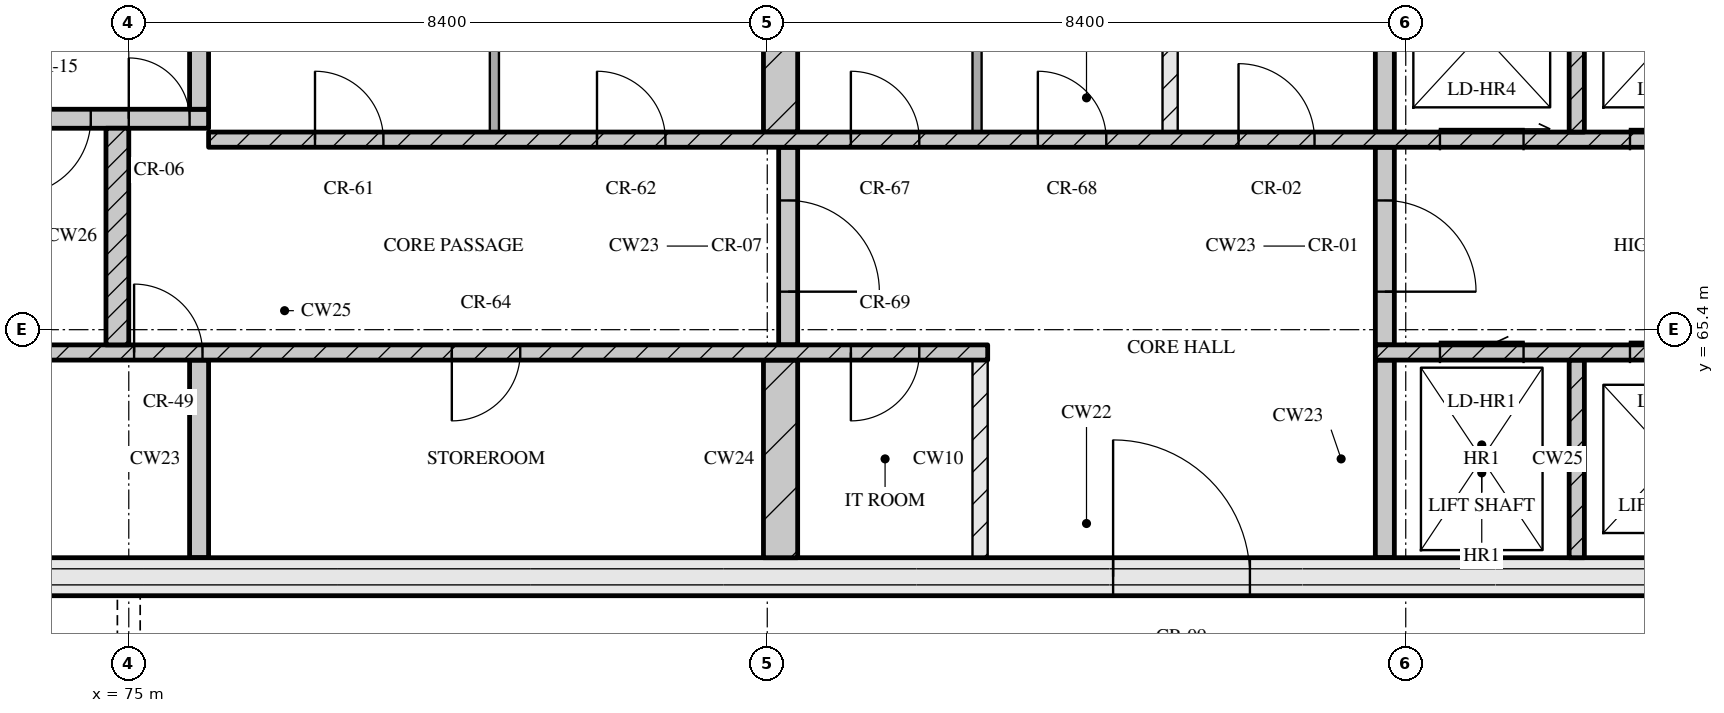
"""IFC4 building model, lengths in metres.
Left out: names, types, materials, properties, quantities, classifications, styles, units other than length and angle.
Written with IfcOpenShell. Run it as: python <this file> out.ifc"""

import sys

from ifc_helpers import new_model, si_unit, direction, frame, frame_2d, origin, place, context, subcontext, project, spatial, rectangle, extrude, element, fill, save


model = new_model("IFC4")
c1 = context("Model", 3, precision=1e-05, world=origin(), true_north=direction((0.0, 1.0)))
c2 = subcontext(c1, "Body", "Model", "MODEL_VIEW")
j1 = project(units=[si_unit("LENGTHUNIT", "METRE"), si_unit("PLANEANGLEUNIT", "RADIAN")], contexts=[c1])
p1 = place(None, origin())
s1 = spatial("IfcSite", under=j1, at=p1, CompositionType="ELEMENT")
p2 = place(p1, origin())
s2 = spatial("IfcBuilding", under=s1, at=p2, CompositionType="ELEMENT")
p3 = place(p2, frame((0.0, 0.0, 299.55)))
s3 = spatial("IfcBuildingStorey", under=s2, at=p3, CompositionType="ELEMENT", Elevation=299.55)
p4 = place(p3, frame((67.3, 62.15, 0.0), z_axis=(0.0, 0.0, 1.0), x_axis=(1.0, 0.0, 0.0)))
e1 = element("IfcWall", 1, at=p4, inside=s3, PredefinedType="SOLIDWALL", context=c2, shape_type="SweptSolid", body=[
    extrude(rectangle(XDim=40.6, YDim=0.5, at=frame_2d((20.3, 0.0))), origin(), (0.0, 0.0, 1.0), 3.32),
])
p5 = place(p4, frame((20.65, 0.0, 0.0)))
e2 = element("IfcOpeningElement", 2, at=p5, cuts=e1, PredefinedType="OPENING", context=c2, shape_type="SweptSolid", body=[
    extrude(rectangle(XDim=1.8, YDim=2.1, at=frame_2d((0.9, 1.05))), frame((0.0, 0.26, 0.0), z_axis=(0.0, -1.0, 0.0), x_axis=(1.0, 0.0, 0.0)), (0.0, 0.0, 1.0), 0.52),
])
p6 = place(p3, frame((75.925, 62.4, 0.0), z_axis=(0.0, 0.0, 1.0), x_axis=(0.0, 1.0, 0.0)))
e3 = element("IfcWall", 3, at=p6, inside=s3, PredefinedType="SOLIDWALL", context=c2, shape_type="SweptSolid", body=[
    extrude(rectangle(XDim=2.6, YDim=0.25, at=frame_2d((1.3, 0.0))), origin(), (0.0, 0.0, 1.0), 3.32),
])
p7 = place(p3, frame((83.575, 62.4, 0.0), z_axis=(0.0, 0.0, 1.0), x_axis=(0.0, 1.0, 0.0)))
e4 = element("IfcWall", 4, at=p7, inside=s3, PredefinedType="SOLIDWALL", context=c2, shape_type="SweptSolid", body=[
    extrude(rectangle(XDim=2.6, YDim=0.45, at=frame_2d((1.3, 0.0))), origin(), (0.0, 0.0, 1.0), 3.32),
])
p8 = place(p3, frame((86.2, 62.4, 0.0), z_axis=(0.0, 0.0, 1.0), x_axis=(0.0, 1.0, 0.0)))
e5 = element("IfcWall", 5, at=p8, inside=s3, PredefinedType="PARTITIONING", context=c2, shape_type="SweptSolid", body=[
    extrude(rectangle(XDim=2.6, YDim=0.2, at=frame_2d((1.3, 0.0))), origin(), (0.0, 0.0, 1.0), 3.32),
])
p9 = place(p3, frame((91.525, 62.4, 0.0), z_axis=(0.0, 0.0, 1.0), x_axis=(0.0, 1.0, 0.0)))
e6 = element("IfcWall", 6, at=p9, inside=s3, PredefinedType="SOLIDWALL", context=c2, shape_type="SweptSolid", body=[
    extrude(rectangle(XDim=2.6, YDim=0.25, at=frame_2d((1.3, 0.0))), origin(), (0.0, 0.0, 1.0), 3.32),
])
p10 = place(p3, frame((94.05, 62.4, 0.0), z_axis=(0.0, 0.0, 1.0), x_axis=(0.0, 1.0, 0.0)))
e7 = element("IfcWall", 7, at=p10, inside=s3, PredefinedType="SOLIDWALL", context=c2, shape_type="SweptSolid", body=[
    extrude(rectangle(XDim=2.6, YDim=0.2, at=frame_2d((1.3, 0.0))), origin(), (0.0, 0.0, 1.0), 3.32),
])
p11 = place(p3, frame((67.8, 65.1, 0.0), z_axis=(0.0, 0.0, 1.0), x_axis=(1.0, 0.0, 0.0)))
e8 = element("IfcWall", 8, at=p11, inside=s3, PredefinedType="SOLIDWALL", context=c2, shape_type="SweptSolid", body=[
    extrude(rectangle(XDim=18.5, YDim=0.2, at=frame_2d((9.25, 0.0))), origin(), (0.0, 0.0, 1.0), 3.32),
])
p12 = place(p11, frame((7.27, 0.0, 0.0)))
e9 = element("IfcOpeningElement", 9, at=p12, cuts=e8, PredefinedType="OPENING", context=c2, shape_type="SweptSolid", body=[
    extrude(rectangle(XDim=0.9, YDim=2.1, at=frame_2d((0.45, 1.05))), frame((0.0, 0.11, 0.0), z_axis=(0.0, -1.0, 0.0), x_axis=(1.0, 0.0, 0.0)), (0.0, 0.0, 1.0), 0.22),
])
p13 = place(p11, frame((11.45, 0.0, 0.0)))
e10 = element("IfcOpeningElement", 10, at=p13, cuts=e8, PredefinedType="OPENING", context=c2, shape_type="SweptSolid", body=[
    extrude(rectangle(XDim=0.9, YDim=2.1, at=frame_2d((0.45, 1.05))), frame((0.0, 0.11, 0.0), z_axis=(0.0, -1.0, 0.0), x_axis=(1.0, 0.0, 0.0)), (0.0, 0.0, 1.0), 0.22),
])
p14 = place(p11, frame((16.7, 0.0, 0.0)))
e11 = element("IfcOpeningElement", 11, at=p14, cuts=e8, PredefinedType="OPENING", context=c2, shape_type="SweptSolid", body=[
    extrude(rectangle(XDim=0.9, YDim=2.1, at=frame_2d((0.45, 1.05))), frame((0.0, 0.11, 0.0), z_axis=(0.0, -1.0, 0.0), x_axis=(1.0, 0.0, 0.0)), (0.0, 0.0, 1.0), 0.22),
])
p15 = place(p3, frame((91.4, 65.1, 0.0), z_axis=(0.0, 0.0, 1.0), x_axis=(1.0, 0.0, 0.0)))
e12 = element("IfcWall", 12, at=p15, inside=s3, PredefinedType="SOLIDWALL", context=c2, shape_type="SweptSolid", body=[
    extrude(rectangle(XDim=16.0, YDim=0.2, at=frame_2d((8.0, 0.0))), origin(), (0.0, 0.0, 1.0), 3.32),
])
p16 = place(p15, frame((0.85, 0.0, 0.0)))
e13 = element("IfcOpeningElement", 13, at=p16, cuts=e12, PredefinedType="OPENING", context=c2, shape_type="SweptSolid", body=[
    extrude(rectangle(XDim=1.1, YDim=2.1, at=frame_2d((0.55, 1.05))), frame((0.0, 0.11, 0.0), z_axis=(0.0, -1.0, 0.0), x_axis=(1.0, 0.0, 0.0)), (0.0, 0.0, 1.0), 0.22),
])
p17 = place(p15, frame((3.35, 0.0, 0.0)))
e14 = element("IfcOpeningElement", 14, at=p17, cuts=e12, PredefinedType="OPENING", context=c2, shape_type="SweptSolid", body=[
    extrude(rectangle(XDim=1.1, YDim=2.1, at=frame_2d((0.55, 1.05))), frame((0.0, 0.11, 0.0), z_axis=(0.0, -1.0, 0.0), x_axis=(1.0, 0.0, 0.0)), (0.0, 0.0, 1.0), 0.22),
])
p18 = place(p15, frame((5.85, 0.0, 0.0)))
e15 = element("IfcOpeningElement", 15, at=p18, cuts=e12, PredefinedType="OPENING", context=c2, shape_type="SweptSolid", body=[
    extrude(rectangle(XDim=1.1, YDim=2.1, at=frame_2d((0.55, 1.05))), frame((0.0, 0.11, 0.0), z_axis=(0.0, -1.0, 0.0), x_axis=(1.0, 0.0, 0.0)), (0.0, 0.0, 1.0), 0.22),
])
p19 = place(p15, frame((7.83, 0.0, 0.0)))
e16 = element("IfcOpeningElement", 16, at=p19, cuts=e12, PredefinedType="OPENING", context=c2, shape_type="SweptSolid", body=[
    extrude(rectangle(XDim=0.9, YDim=2.1, at=frame_2d((0.45, 1.05))), frame((0.0, 0.11, 0.0), z_axis=(0.0, -1.0, 0.0), x_axis=(1.0, 0.0, 0.0)), (0.0, 0.0, 1.0), 0.22),
])
p20 = place(p3, frame((74.85, 65.2, 0.0), z_axis=(0.0, 0.0, 1.0), x_axis=(0.0, 1.0, 0.0)))
e17 = element("IfcWall", 17, at=p20, inside=s3, PredefinedType="SOLIDWALL", context=c2, shape_type="SweptSolid", body=[
    extrude(rectangle(XDim=2.85, YDim=0.3, at=frame_2d((1.425, 0.0))), origin(), (0.0, 0.0, 1.0), 3.32),
])
p21 = place(p3, frame((83.675, 65.2, 0.0), z_axis=(0.0, 0.0, 1.0), x_axis=(0.0, 1.0, 0.0)))
e18 = element("IfcWall", 18, at=p21, inside=s3, PredefinedType="SOLIDWALL", context=c2, shape_type="SweptSolid", body=[
    extrude(rectangle(XDim=2.6, YDim=0.25, at=frame_2d((1.3, 0.0))), origin(), (0.0, 0.0, 1.0), 3.32),
])
p22 = place(p21, frame((0.7, 0.0, 0.0)))
e19 = element("IfcOpeningElement", 19, at=p22, cuts=e18, PredefinedType="OPENING", context=c2, shape_type="SweptSolid", body=[
    extrude(rectangle(XDim=1.2, YDim=2.1, at=frame_2d((0.6, 1.05))), frame((0.0, 0.135, 0.0), z_axis=(0.0, -1.0, 0.0), x_axis=(1.0, 0.0, 0.0)), (0.0, 0.0, 1.0), 0.27),
])
p23 = place(p3, frame((91.525, 65.2, 0.0), z_axis=(0.0, 0.0, 1.0), x_axis=(0.0, 1.0, 0.0)))
e20 = element("IfcWall", 20, at=p23, inside=s3, PredefinedType="SOLIDWALL", context=c2, shape_type="SweptSolid", body=[
    extrude(rectangle(XDim=2.6, YDim=0.25, at=frame_2d((1.3, 0.0))), origin(), (0.0, 0.0, 1.0), 3.32),
])
p24 = place(p23, frame((0.7, 0.0, 0.0)))
e21 = element("IfcOpeningElement", 21, at=p24, cuts=e20, PredefinedType="OPENING", context=c2, shape_type="SweptSolid", body=[
    extrude(rectangle(XDim=1.2, YDim=2.1, at=frame_2d((0.6, 1.05))), frame((0.0, 0.135, 0.0), z_axis=(0.0, -1.0, 0.0), x_axis=(1.0, 0.0, 0.0)), (0.0, 0.0, 1.0), 0.27),
])
p25 = place(p3, frame((76.05, 67.9, 0.0), z_axis=(0.0, 0.0, 1.0), x_axis=(1.0, 0.0, 0.0)))
e22 = element("IfcWall", 22, at=p25, inside=s3, PredefinedType="SOLIDWALL", context=c2, shape_type="SweptSolid", body=[
    extrude(rectangle(XDim=23.1, YDim=0.2, at=frame_2d((11.55, 0.0))), origin(), (0.0, 0.0, 1.0), 3.32),
])
p26 = place(p25, frame((1.4, 0.0, 0.0)))
e23 = element("IfcOpeningElement", 23, at=p26, cuts=e22, PredefinedType="OPENING", context=c2, shape_type="SweptSolid", body=[
    extrude(rectangle(XDim=0.9, YDim=2.1, at=frame_2d((0.45, 1.05))), frame((0.0, 0.11, 0.0), z_axis=(0.0, -1.0, 0.0), x_axis=(1.0, 0.0, 0.0)), (0.0, 0.0, 1.0), 0.22),
])
p27 = place(p25, frame((5.11, 0.0, 0.0)))
e24 = element("IfcOpeningElement", 24, at=p27, cuts=e22, PredefinedType="OPENING", context=c2, shape_type="SweptSolid", body=[
    extrude(rectangle(XDim=0.9, YDim=2.1, at=frame_2d((0.45, 1.05))), frame((0.0, 0.11, 0.0), z_axis=(0.0, -1.0, 0.0), x_axis=(1.0, 0.0, 0.0)), (0.0, 0.0, 1.0), 0.22),
])
p28 = place(p25, frame((8.45, 0.0, 0.0)))
e25 = element("IfcOpeningElement", 25, at=p28, cuts=e22, PredefinedType="OPENING", context=c2, shape_type="SweptSolid", body=[
    extrude(rectangle(XDim=0.9, YDim=2.1, at=frame_2d((0.45, 1.05))), frame((0.0, 0.11, 0.0), z_axis=(0.0, -1.0, 0.0), x_axis=(1.0, 0.0, 0.0)), (0.0, 0.0, 1.0), 0.22),
])
p29 = place(p25, frame((10.91, 0.0, 0.0)))
e26 = element("IfcOpeningElement", 26, at=p29, cuts=e22, PredefinedType="OPENING", context=c2, shape_type="SweptSolid", body=[
    extrude(rectangle(XDim=0.9, YDim=2.1, at=frame_2d((0.45, 1.05))), frame((0.0, 0.11, 0.0), z_axis=(0.0, -1.0, 0.0), x_axis=(1.0, 0.0, 0.0)), (0.0, 0.0, 1.0), 0.22),
])
p30 = place(p25, frame((13.55, 0.0, 0.0)))
e27 = element("IfcOpeningElement", 27, at=p30, cuts=e22, PredefinedType="OPENING", context=c2, shape_type="SweptSolid", body=[
    extrude(rectangle(XDim=1.0, YDim=2.1, at=frame_2d((0.5, 1.05))), frame((0.0, 0.11, 0.0), z_axis=(0.0, -1.0, 0.0), x_axis=(1.0, 0.0, 0.0)), (0.0, 0.0, 1.0), 0.22),
])
p31 = place(p25, frame((16.2, 0.0, 0.0)))
e28 = element("IfcOpeningElement", 28, at=p31, cuts=e22, PredefinedType="OPENING", context=c2, shape_type="SweptSolid", body=[
    extrude(rectangle(XDim=1.1, YDim=2.1, at=frame_2d((0.55, 1.05))), frame((0.0, 0.11, 0.0), z_axis=(0.0, -1.0, 0.0), x_axis=(1.0, 0.0, 0.0)), (0.0, 0.0, 1.0), 0.22),
])
p32 = place(p25, frame((18.7, 0.0, 0.0)))
e29 = element("IfcOpeningElement", 29, at=p32, cuts=e22, PredefinedType="OPENING", context=c2, shape_type="SweptSolid", body=[
    extrude(rectangle(XDim=1.1, YDim=2.1, at=frame_2d((0.55, 1.05))), frame((0.0, 0.11, 0.0), z_axis=(0.0, -1.0, 0.0), x_axis=(1.0, 0.0, 0.0)), (0.0, 0.0, 1.0), 0.22),
])
p33 = place(p25, frame((21.2, 0.0, 0.0)))
e30 = element("IfcOpeningElement", 30, at=p33, cuts=e22, PredefinedType="OPENING", context=c2, shape_type="SweptSolid", body=[
    extrude(rectangle(XDim=1.1, YDim=2.1, at=frame_2d((0.55, 1.05))), frame((0.0, 0.11, 0.0), z_axis=(0.0, -1.0, 0.0), x_axis=(1.0, 0.0, 0.0)), (0.0, 0.0, 1.0), 0.22),
])
p34 = place(p3, frame((79.81, 68.0, 0.0), z_axis=(0.0, 0.0, 1.0), x_axis=(0.0, 1.0, 0.0)))
e31 = element("IfcWall", 31, at=p34, inside=s3, PredefinedType="PARTITIONING", context=c2, shape_type="SweptSolid", body=[
    extrude(rectangle(XDim=2.6, YDim=0.12, at=frame_2d((1.3, 0.0))), origin(), (0.0, 0.0, 1.0), 3.32),
])
p35 = place(p3, frame((83.575, 68.0, 0.0), z_axis=(0.0, 0.0, 1.0), x_axis=(0.0, 1.0, 0.0)))
e32 = element("IfcWall", 32, at=p35, inside=s3, PredefinedType="SOLIDWALL", context=c2, shape_type="SweptSolid", body=[
    extrude(rectangle(XDim=2.6, YDim=0.45, at=frame_2d((1.3, 0.0))), origin(), (0.0, 0.0, 1.0), 3.32),
])
p36 = place(p3, frame((86.16, 68.0, 0.0), z_axis=(0.0, 0.0, 1.0), x_axis=(0.0, 1.0, 0.0)))
e33 = element("IfcWall", 33, at=p36, inside=s3, PredefinedType="PARTITIONING", context=c2, shape_type="SweptSolid", body=[
    extrude(rectangle(XDim=2.6, YDim=0.12, at=frame_2d((1.3, 0.0))), origin(), (0.0, 0.0, 1.0), 3.32),
])
p37 = place(p3, frame((88.7, 68.0, 0.0), z_axis=(0.0, 0.0, 1.0), x_axis=(0.0, 1.0, 0.0)))
e34 = element("IfcWall", 34, at=p37, inside=s3, PredefinedType="PARTITIONING", context=c2, shape_type="SweptSolid", body=[
    extrude(rectangle(XDim=2.6, YDim=0.2, at=frame_2d((1.3, 0.0))), origin(), (0.0, 0.0, 1.0), 3.32),
])
p38 = place(p3, frame((91.525, 68.0, 0.0), z_axis=(0.0, 0.0, 1.0), x_axis=(0.0, 1.0, 0.0)))
e35 = element("IfcWall", 35, at=p38, inside=s3, PredefinedType="SOLIDWALL", context=c2, shape_type="SweptSolid", body=[
    extrude(rectangle(XDim=2.6, YDim=0.25, at=frame_2d((1.3, 0.0))), origin(), (0.0, 0.0, 1.0), 3.32),
])
p39 = place(p3, frame((94.05, 68.0, 0.0), z_axis=(0.0, 0.0, 1.0), x_axis=(0.0, 1.0, 0.0)))
e36 = element("IfcWall", 36, at=p39, inside=s3, PredefinedType="SOLIDWALL", context=c2, shape_type="SweptSolid", body=[
    extrude(rectangle(XDim=2.6, YDim=0.2, at=frame_2d((1.3, 0.0))), origin(), (0.0, 0.0, 1.0), 3.32),
])
p40 = place(p3, frame((67.8, 68.175, 0.0), z_axis=(0.0, 0.0, 1.0), x_axis=(1.0, 0.0, 0.0)))
e37 = element("IfcWall", 37, at=p40, inside=s3, PredefinedType="SOLIDWALL", context=c2, shape_type="SweptSolid", body=[
    extrude(rectangle(XDim=8.25, YDim=0.25, at=frame_2d((4.125, 0.0))), origin(), (0.0, 0.0, 1.0), 3.32),
])
p41 = place(p40, frame((5.7, 0.0, 0.0)))
e38 = element("IfcOpeningElement", 38, at=p41, cuts=e37, PredefinedType="OPENING", context=c2, shape_type="SweptSolid", body=[
    extrude(rectangle(XDim=1.0, YDim=2.1, at=frame_2d((0.5, 1.05))), frame((0.0, 0.135, 0.0), z_axis=(0.0, -1.0, 0.0), x_axis=(1.0, 0.0, 0.0)), (0.0, 0.0, 1.0), 0.27),
])
p42 = place(p40, frame((7.2, 0.0, 0.0)))
e39 = element("IfcOpeningElement", 39, at=p42, cuts=e37, PredefinedType="OPENING", context=c2, shape_type="SweptSolid", body=[
    extrude(rectangle(XDim=0.8, YDim=2.1, at=frame_2d((0.4, 1.05))), frame((0.0, 0.135, 0.0), z_axis=(0.0, -1.0, 0.0), x_axis=(1.0, 0.0, 0.0)), (0.0, 0.0, 1.0), 0.27),
])
p43 = place(p3, frame((75.925, 68.3, 0.0), z_axis=(0.0, 0.0, 1.0), x_axis=(0.0, 1.0, 0.0)))
e40 = element("IfcWall", 40, at=p43, inside=s3, PredefinedType="SOLIDWALL", context=c2, shape_type="SweptSolid", body=[
    extrude(rectangle(XDim=2.3, YDim=0.25, at=frame_2d((1.15, 0.0))), origin(), (0.0, 0.0, 1.0), 3.32),
])
p44 = place(p5, origin())
e41 = element("IfcDoor", 41, at=p44, inside=s3, OperationType="DOUBLE_DOOR_SINGLE_SWING", PredefinedType="DOOR", context=c2, shape_type="SweptSolid", body=[
    extrude(rectangle(XDim=1.8, YDim=2.1, at=frame_2d((0.9, 1.05))), frame((0.0, 0.025, 0.0), z_axis=(0.0, -1.0, 0.0), x_axis=(1.0, 0.0, 0.0)), (0.0, 0.0, 1.0), 0.05),
])
fill(e2, e41)
p45 = place(p12, origin())
e42 = element("IfcDoor", 42, at=p45, inside=s3, OperationType="SINGLE_SWING_LEFT", PredefinedType="DOOR", context=c2, shape_type="SweptSolid", body=[
    extrude(rectangle(XDim=0.9, YDim=2.1, at=frame_2d((0.45, 1.05))), frame((0.0, 0.025, 0.0), z_axis=(0.0, -1.0, 0.0), x_axis=(1.0, 0.0, 0.0)), (0.0, 0.0, 1.0), 0.05),
])
fill(e9, e42)
p46 = place(p13, origin())
e43 = element("IfcDoor", 43, at=p46, inside=s3, OperationType="SINGLE_SWING_RIGHT", PredefinedType="DOOR", context=c2, shape_type="SweptSolid", body=[
    extrude(rectangle(XDim=0.9, YDim=2.1, at=frame_2d((0.45, 1.05))), frame((0.0, 0.025, 0.0), z_axis=(0.0, -1.0, 0.0), x_axis=(1.0, 0.0, 0.0)), (0.0, 0.0, 1.0), 0.05),
])
fill(e10, e43)
p47 = place(p14, origin())
e44 = element("IfcDoor", 44, at=p47, inside=s3, OperationType="SINGLE_SWING_RIGHT", PredefinedType="DOOR", context=c2, shape_type="SweptSolid", body=[
    extrude(rectangle(XDim=0.9, YDim=2.1, at=frame_2d((0.45, 1.05))), frame((0.0, 0.025, 0.0), z_axis=(0.0, -1.0, 0.0), x_axis=(1.0, 0.0, 0.0)), (0.0, 0.0, 1.0), 0.05),
])
fill(e11, e44)
p48 = place(p16, origin())
e45 = element("IfcDoor", 45, at=p48, inside=s3, OperationType="SLIDING_TO_LEFT", PredefinedType="DOOR", context=c2, shape_type="SweptSolid", body=[
    extrude(rectangle(XDim=1.1, YDim=2.1, at=frame_2d((0.55, 1.05))), frame((0.0, 0.025, 0.0), z_axis=(0.0, -1.0, 0.0), x_axis=(1.0, 0.0, 0.0)), (0.0, 0.0, 1.0), 0.05),
])
fill(e13, e45)
p49 = place(p17, origin())
e46 = element("IfcDoor", 46, at=p49, inside=s3, OperationType="SLIDING_TO_LEFT", PredefinedType="DOOR", context=c2, shape_type="SweptSolid", body=[
    extrude(rectangle(XDim=1.1, YDim=2.1, at=frame_2d((0.55, 1.05))), frame((0.0, 0.025, 0.0), z_axis=(0.0, -1.0, 0.0), x_axis=(1.0, 0.0, 0.0)), (0.0, 0.0, 1.0), 0.05),
])
fill(e14, e46)
p50 = place(p22, origin())
e47 = element("IfcDoor", 47, at=p50, inside=s3, OperationType="SINGLE_SWING_RIGHT", PredefinedType="DOOR", context=c2, shape_type="SweptSolid", body=[
    extrude(rectangle(XDim=1.2, YDim=2.1, at=frame_2d((0.6, 1.05))), frame((0.0, 0.025, 0.0), z_axis=(0.0, -1.0, 0.0), x_axis=(1.0, 0.0, 0.0)), (0.0, 0.0, 1.0), 0.05),
])
fill(e19, e47)
p51 = place(p24, origin())
e48 = element("IfcDoor", 48, at=p51, inside=s3, OperationType="SINGLE_SWING_RIGHT", PredefinedType="DOOR", context=c2, shape_type="SweptSolid", body=[
    extrude(rectangle(XDim=1.2, YDim=2.1, at=frame_2d((0.6, 1.05))), frame((0.0, 0.025, 0.0), z_axis=(0.0, -1.0, 0.0), x_axis=(1.0, 0.0, 0.0)), (0.0, 0.0, 1.0), 0.05),
])
fill(e21, e48)
p52 = place(p26, origin())
e49 = element("IfcDoor", 49, at=p52, inside=s3, OperationType="SINGLE_SWING_LEFT", PredefinedType="DOOR", context=c2, shape_type="SweptSolid", body=[
    extrude(rectangle(XDim=0.9, YDim=2.1, at=frame_2d((0.45, 1.05))), frame((0.0, 0.025, 0.0), z_axis=(0.0, -1.0, 0.0), x_axis=(1.0, 0.0, 0.0)), (0.0, 0.0, 1.0), 0.05),
])
fill(e23, e49)
p53 = place(p27, origin())
e50 = element("IfcDoor", 50, at=p53, inside=s3, OperationType="SINGLE_SWING_LEFT", PredefinedType="DOOR", context=c2, shape_type="SweptSolid", body=[
    extrude(rectangle(XDim=0.9, YDim=2.1, at=frame_2d((0.45, 1.05))), frame((0.0, 0.025, 0.0), z_axis=(0.0, -1.0, 0.0), x_axis=(1.0, 0.0, 0.0)), (0.0, 0.0, 1.0), 0.05),
])
fill(e24, e50)
p54 = place(p28, origin())
e51 = element("IfcDoor", 51, at=p54, inside=s3, OperationType="SINGLE_SWING_LEFT", PredefinedType="DOOR", context=c2, shape_type="SweptSolid", body=[
    extrude(rectangle(XDim=0.9, YDim=2.1, at=frame_2d((0.45, 1.05))), frame((0.0, 0.025, 0.0), z_axis=(0.0, -1.0, 0.0), x_axis=(1.0, 0.0, 0.0)), (0.0, 0.0, 1.0), 0.05),
])
fill(e25, e51)
p55 = place(p29, origin())
e52 = element("IfcDoor", 52, at=p55, inside=s3, OperationType="SINGLE_SWING_LEFT", PredefinedType="DOOR", context=c2, shape_type="SweptSolid", body=[
    extrude(rectangle(XDim=0.9, YDim=2.1, at=frame_2d((0.45, 1.05))), frame((0.0, 0.025, 0.0), z_axis=(0.0, -1.0, 0.0), x_axis=(1.0, 0.0, 0.0)), (0.0, 0.0, 1.0), 0.05),
])
fill(e26, e52)
p56 = place(p30, origin())
e53 = element("IfcDoor", 53, at=p56, inside=s3, OperationType="SINGLE_SWING_LEFT", PredefinedType="DOOR", context=c2, shape_type="SweptSolid", body=[
    extrude(rectangle(XDim=1.0, YDim=2.1, at=frame_2d((0.5, 1.05))), frame((0.0, 0.025, 0.0), z_axis=(0.0, -1.0, 0.0), x_axis=(1.0, 0.0, 0.0)), (0.0, 0.0, 1.0), 0.05),
])
fill(e27, e53)
p57 = place(p31, origin())
e54 = element("IfcDoor", 54, at=p57, inside=s3, OperationType="SLIDING_TO_RIGHT", PredefinedType="DOOR", context=c2, shape_type="SweptSolid", body=[
    extrude(rectangle(XDim=1.1, YDim=2.1, at=frame_2d((0.55, 1.05))), frame((0.0, 0.025, 0.0), z_axis=(0.0, -1.0, 0.0), x_axis=(1.0, 0.0, 0.0)), (0.0, 0.0, 1.0), 0.05),
])
fill(e28, e54)
p58 = place(p32, origin())
e55 = element("IfcDoor", 55, at=p58, inside=s3, OperationType="SLIDING_TO_RIGHT", PredefinedType="DOOR", context=c2, shape_type="SweptSolid", body=[
    extrude(rectangle(XDim=1.1, YDim=2.1, at=frame_2d((0.55, 1.05))), frame((0.0, 0.025, 0.0), z_axis=(0.0, -1.0, 0.0), x_axis=(1.0, 0.0, 0.0)), (0.0, 0.0, 1.0), 0.05),
])
fill(e29, e55)
p59 = place(p41, origin())
e56 = element("IfcDoor", 56, at=p59, inside=s3, OperationType="SINGLE_SWING_RIGHT", PredefinedType="DOOR", context=c2, shape_type="SweptSolid", body=[
    extrude(rectangle(XDim=1.0, YDim=2.1, at=frame_2d((0.5, 1.05))), frame((0.0, 0.025, 0.0), z_axis=(0.0, -1.0, 0.0), x_axis=(1.0, 0.0, 0.0)), (0.0, 0.0, 1.0), 0.05),
])
fill(e38, e56)
p60 = place(p42, origin())
e57 = element("IfcDoor", 57, at=p60, inside=s3, OperationType="SINGLE_SWING_LEFT", PredefinedType="DOOR", context=c2, shape_type="SweptSolid", body=[
    extrude(rectangle(XDim=0.8, YDim=2.1, at=frame_2d((0.4, 1.05))), frame((0.0, 0.025, 0.0), z_axis=(0.0, -1.0, 0.0), x_axis=(1.0, 0.0, 0.0)), (0.0, 0.0, 1.0), 0.05),
])
fill(e39, e57)
save(model, sys.argv[1])
